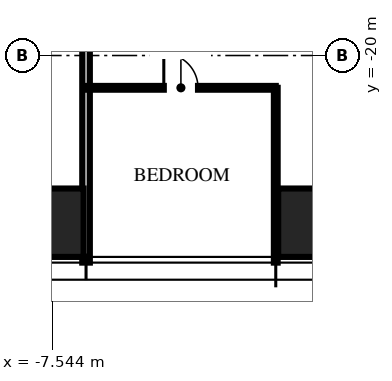
"""IFC4 building model, lengths in metres.
Left out: names, types, materials, properties, quantities, classifications, styles, units other than length and angle.
Written with IfcOpenShell. Run it as: python <this file> out.ifc"""

import sys

from ifc_helpers import new_model, si_unit, direction, frame, frame_2d, origin, origin_2d, place, context, subcontext, project, spatial, rectangle, hollow_rectangle, extrude, element, fill, save


model = new_model("IFC4")
c1 = context("Model", 3, precision=1e-05, world=origin(), true_north=direction((0.0, 1.0)))
c2 = subcontext(c1, "Body", "Model", "MODEL_VIEW")
j1 = project(units=[si_unit("LENGTHUNIT", "METRE"), si_unit("PLANEANGLEUNIT", "RADIAN")], contexts=[c1])
p1 = place(None, origin())
s1 = spatial("IfcSite", under=j1, at=p1, CompositionType="ELEMENT")
p2 = place(p1, origin())
s2 = spatial("IfcBuilding", under=s1, at=p2, CompositionType="ELEMENT")
p3 = place(p2, frame((0.0, 0.0, 267.0)))
s3 = spatial("IfcBuildingStorey", under=s2, at=p3, CompositionType="ELEMENT", Elevation=267.0)
for number, where, z_axis, x_axis in (
    (1, (0.0, -24.4, 0.0), (0.0, 0.0, 1.0), (1.0, 0.0, 0.0)),
    (2, (-8.32, -24.4, 0.0), (0.0, 0.0, 1.0), (1.0, 0.0, 0.0)),
):
    element("IfcColumn", number, at=place(p3, frame(where, z_axis=z_axis, x_axis=x_axis)), inside=s3, PredefinedType="COLUMN", context=c2, shape_type="SweptSolid", body=[
        extrude(hollow_rectangle(XDim=3.2, YDim=1.8, WallThickness=0.14, at=origin_2d()), origin(), (0.0, 0.0, 1.0), 3.75),
    ])
p4 = place(p3, frame((-6.656, -12.8, 0.0), z_axis=(0.0, 0.0, 1.0), x_axis=(0.0, -1.0, 0.0)))
e3 = element("IfcWall", 3, at=p4, inside=s3, PredefinedType="PARTITIONING", context=c2, shape_type="SweptSolid", body=[
    extrude(rectangle(XDim=12.65, YDim=0.2, at=frame_2d((6.325, 0.0))), origin(), (0.0, 0.0, 1.0), 2.91),
])
p5 = place(p3, frame((-1.664, -20.85, 0.0), z_axis=(0.0, 0.0, 1.0), x_axis=(0.0, -1.0, 0.0)))
e4 = element("IfcWall", 4, at=p5, inside=s3, PredefinedType="PARTITIONING", context=c2, shape_type="SweptSolid", body=[
    extrude(rectangle(XDim=4.6, YDim=0.1, at=frame_2d((2.3, 0.0))), origin(), (0.0, 0.0, 1.0), 2.91),
])
p6 = place(p3, frame((-6.656, -20.85, 0.0), z_axis=(0.0, 0.0, 1.0), x_axis=(1.0, 0.0, 0.0)))
e5 = element("IfcWall", 5, at=p6, inside=s3, PredefinedType="PARTITIONING", context=c2, shape_type="SweptSolid", body=[
    extrude(rectangle(XDim=4.992, YDim=0.1, at=frame_2d((2.496, 0.0))), origin(), (0.0, 0.0, 1.0), 2.81),
])
p7 = place(p6, frame((2.046, 0.0, 0.0)))
e6 = element("IfcOpeningElement", 6, at=p7, cuts=e5, PredefinedType="OPENING", context=c2, shape_type="SweptSolid", body=[
    extrude(rectangle(XDim=0.9, YDim=2.1, at=frame_2d((0.45, 1.05))), frame((0.0, 0.06, 0.0), z_axis=(0.0, -1.0, 0.0), x_axis=(1.0, 0.0, 0.0)), (0.0, 0.0, 1.0), 0.12),
])
p8 = place(p7, origin())
e7 = element("IfcDoor", 7, at=p8, inside=s3, OperationType="SINGLE_SWING_LEFT", PredefinedType="DOOR", context=c2, shape_type="SweptSolid", body=[
    extrude(rectangle(XDim=0.9, YDim=2.1, at=frame_2d((0.45, 1.05))), frame((0.0, 0.025, 0.0), z_axis=(0.0, -1.0, 0.0), x_axis=(1.0, 0.0, 0.0)), (0.0, 0.0, 1.0), 0.05),
])
fill(e6, e7)
save(model, sys.argv[1])
